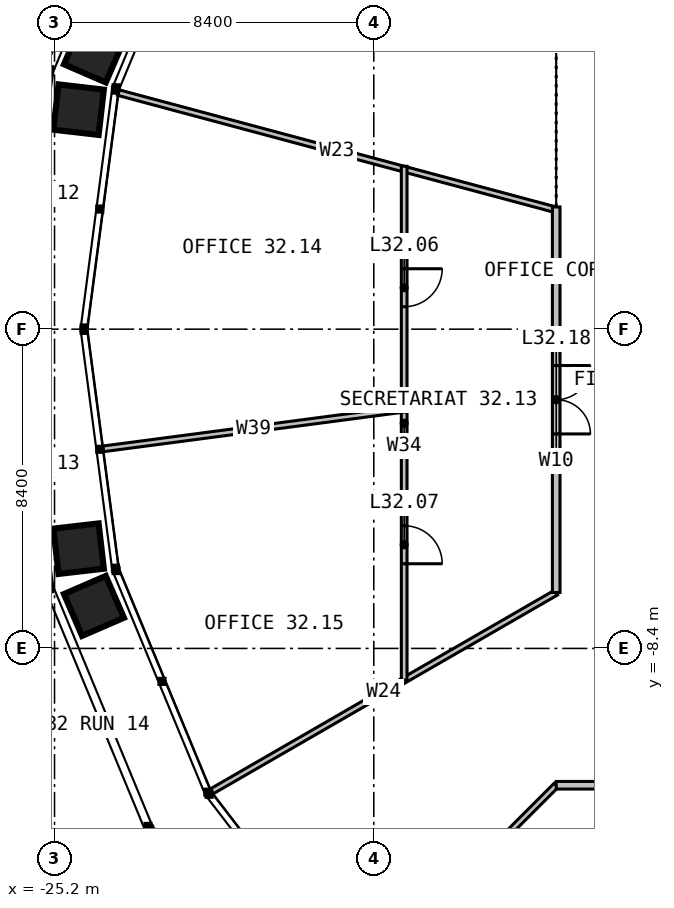
"""IFC4 building model, lengths in metres.
Left out: names, types, materials, properties, quantities, classifications, styles, units other than length and angle.
Written with IfcOpenShell. Run it as: python <this file> out.ifc"""

import sys

from ifc_helpers import new_model, si_unit, direction, frame, frame_2d, origin, place, context, subcontext, project, spatial, rectangle, extrude, element, fill, save


model = new_model("IFC4")
c1 = context("Model", 3, precision=1e-05, world=origin(), true_north=direction((0.0, 1.0)))
c2 = subcontext(c1, "Body", "Model", "MODEL_VIEW")
j1 = project(units=[si_unit("LENGTHUNIT", "METRE"), si_unit("PLANEANGLEUNIT", "RADIAN")], contexts=[c1])
p1 = place(None, origin())
s1 = spatial("IfcSite", under=j1, at=p1, CompositionType="ELEMENT")
p2 = place(p1, origin())
s2 = spatial("IfcBuilding", under=s1, at=p2, CompositionType="ELEMENT")
p3 = place(p2, frame((0.0, 0.0, 134.0)))
s3 = spatial("IfcBuildingStorey", under=s2, at=p3, CompositionType="ELEMENT", Elevation=134.0)
p4 = place(p3, frame((-12.02, 3.143, 0.0), z_axis=(0.0, 0.0, 1.0), x_axis=(-0.965924994823, 0.258822148155, 0.0)))
e1 = element("IfcWall", 1, at=p4, inside=s3, PredefinedType="PARTITIONING", context=c2, shape_type="SweptSolid", body=[
    extrude(rectangle(XDim=11.911, YDim=0.15, at=frame_2d((5.955, 0.0))), origin(), (0.0, 0.0, 1.0), 2.79),
])
p5 = place(p3, frame((-12.0, -6.928, 0.0), z_axis=(0.0, 0.0, 1.0), x_axis=(-0.866029212144, -0.49999340367, 0.0)))
e2 = element("IfcWall", 2, at=p5, inside=s3, PredefinedType="PARTITIONING", context=c2, shape_type="SweptSolid", body=[
    extrude(rectangle(XDim=10.478, YDim=0.15, at=frame_2d((5.239, 0.0))), origin(), (0.0, 0.0, 1.0), 2.79),
])
p6 = place(p3, frame((-12.0, -12.0, 0.0), z_axis=(0.0, 0.0, 1.0), x_axis=(-0.707106781187, -0.707106781187, 0.0)))
e3 = element("IfcWall", 3, at=p6, inside=s3, PredefinedType="PARTITIONING", context=c2, shape_type="SweptSolid", body=[
    extrude(rectangle(XDim=7.364, YDim=0.15, at=frame_2d((3.682, 0.0))), origin(), (0.0, 0.0, 1.0), 2.79),
])
p7 = place(p3, frame((-6.928, -12.0, 0.0), z_axis=(0.0, 0.0, 1.0), x_axis=(-0.49999340367, -0.866029212144, 0.0)))
e4 = element("IfcWall", 4, at=p7, inside=s3, PredefinedType="PARTITIONING", context=c2, shape_type="SweptSolid", body=[
    extrude(rectangle(XDim=10.478, YDim=0.15, at=frame_2d((5.239, 0.0))), origin(), (0.0, 0.0, 1.0), 2.79),
])
p8 = place(p3, frame((-16.0, 4.287, 0.0), z_axis=(0.0, 0.0, 1.0), x_axis=(0.0, -1.0, 0.0)))
e5 = element("IfcWall", 5, at=p8, inside=s3, PredefinedType="PARTITIONING", context=c2, shape_type="SweptSolid", body=[
    extrude(rectangle(XDim=13.525, YDim=0.15, at=frame_2d((6.762, 0.0))), origin(), (0.0, 0.0, 1.0), 2.79),
])
p9 = place(p8, frame((2.697, 0.0, 0.0)))
e6 = element("IfcOpeningElement", 6, at=p9, cuts=e5, PredefinedType="OPENING", context=c2, shape_type="SweptSolid", body=[
    extrude(rectangle(XDim=1.0, YDim=2.2, at=frame_2d((0.5, 1.1))), frame((0.0, 0.085, 0.0), z_axis=(0.0, -1.0, 0.0), x_axis=(1.0, 0.0, 0.0)), (0.0, 0.0, 1.0), 0.17),
])
p10 = place(p8, frame((9.459, 0.0, 0.0)))
e7 = element("IfcOpeningElement", 7, at=p10, cuts=e5, PredefinedType="OPENING", context=c2, shape_type="SweptSolid", body=[
    extrude(rectangle(XDim=1.0, YDim=2.2, at=frame_2d((0.5, 1.1))), frame((0.0, 0.085, 0.0), z_axis=(0.0, -1.0, 0.0), x_axis=(1.0, 0.0, 0.0)), (0.0, 0.0, 1.0), 0.17),
])
p11 = place(p3, frame((-16.0, -2.106, 0.0), z_axis=(0.0, 0.0, 1.0), x_axis=(-0.991443577351, -0.13053594497, 0.0)))
e8 = element("IfcWall", 8, at=p11, inside=s3, PredefinedType="PARTITIONING", context=c2, shape_type="SweptSolid", body=[
    extrude(rectangle(XDim=7.988, YDim=0.15, at=frame_2d((3.994, 0.0))), origin(), (0.0, 0.0, 1.0), 2.79),
])
p12 = place(p3, frame((-12.0, 3.215, 0.0), z_axis=(0.0, 0.0, 1.0), x_axis=(0.0, -1.0, 0.0)))
e9 = element("IfcWall", 9, at=p12, inside=s3, PredefinedType="PARTITIONING", context=c2, shape_type="SweptSolid", body=[
    extrude(rectangle(XDim=10.144, YDim=0.2, at=frame_2d((5.072, 0.0))), origin(), (0.0, 0.0, 1.0), 3.8),
])
p13 = place(p12, frame((4.172, 0.0, 0.0)))
e10 = element("IfcOpeningElement", 10, at=p13, cuts=e9, PredefinedType="OPENING", context=c2, shape_type="SweptSolid", body=[
    extrude(rectangle(XDim=1.8, YDim=2.2, at=frame_2d((0.9, 1.1))), frame((0.0, 0.11, 0.0), z_axis=(0.0, -1.0, 0.0), x_axis=(1.0, 0.0, 0.0)), (0.0, 0.0, 1.0), 0.22),
])
p14 = place(p3, frame((-12.0, -12.0, 0.0), z_axis=(0.0, 0.0, 1.0), x_axis=(1.0, 0.0, 0.0)))
e11 = element("IfcWall", 11, at=p14, inside=s3, PredefinedType="PARTITIONING", context=c2, shape_type="SweptSolid", body=[
    extrude(rectangle(XDim=5.072, YDim=0.2, at=frame_2d((2.536, 0.0))), origin(), (0.0, 0.0, 1.0), 3.8),
])
p15 = place(p14, frame((2.036, 0.0, 0.0)))
e12 = element("IfcOpeningElement", 12, at=p15, cuts=e11, PredefinedType="OPENING", context=c2, shape_type="SweptSolid", body=[
    extrude(rectangle(XDim=1.0, YDim=2.2, at=frame_2d((0.5, 1.1))), frame((0.0, 0.11, 0.0), z_axis=(0.0, -1.0, 0.0), x_axis=(1.0, 0.0, 0.0)), (0.0, 0.0, 1.0), 0.22),
])
p16 = place(p9, origin())
e13 = element("IfcDoor", 13, at=p16, inside=s3, OperationType="SINGLE_SWING_LEFT", PredefinedType="DOOR", context=c2, shape_type="SweptSolid", body=[
    extrude(rectangle(XDim=1.0, YDim=2.2, at=frame_2d((0.5, 1.1))), frame((0.0, 0.025, 0.0), z_axis=(0.0, -1.0, 0.0), x_axis=(1.0, 0.0, 0.0)), (0.0, 0.0, 1.0), 0.05),
])
fill(e6, e13)
p17 = place(p10, origin())
e14 = element("IfcDoor", 14, at=p17, inside=s3, OperationType="SINGLE_SWING_RIGHT", PredefinedType="DOOR", context=c2, shape_type="SweptSolid", body=[
    extrude(rectangle(XDim=1.0, YDim=2.2, at=frame_2d((0.5, 1.1))), frame((0.0, 0.025, 0.0), z_axis=(0.0, -1.0, 0.0), x_axis=(1.0, 0.0, 0.0)), (0.0, 0.0, 1.0), 0.05),
])
fill(e7, e14)
p18 = place(p13, origin())
e15 = element("IfcDoor", 15, at=p18, inside=s3, OperationType="DOUBLE_DOOR_SINGLE_SWING", PredefinedType="DOOR", context=c2, shape_type="SweptSolid", body=[
    extrude(rectangle(XDim=1.8, YDim=2.2, at=frame_2d((0.9, 1.1))), frame((0.0, 0.025, 0.0), z_axis=(0.0, -1.0, 0.0), x_axis=(1.0, 0.0, 0.0)), (0.0, 0.0, 1.0), 0.05),
])
fill(e10, e15)
save(model, sys.argv[1])
